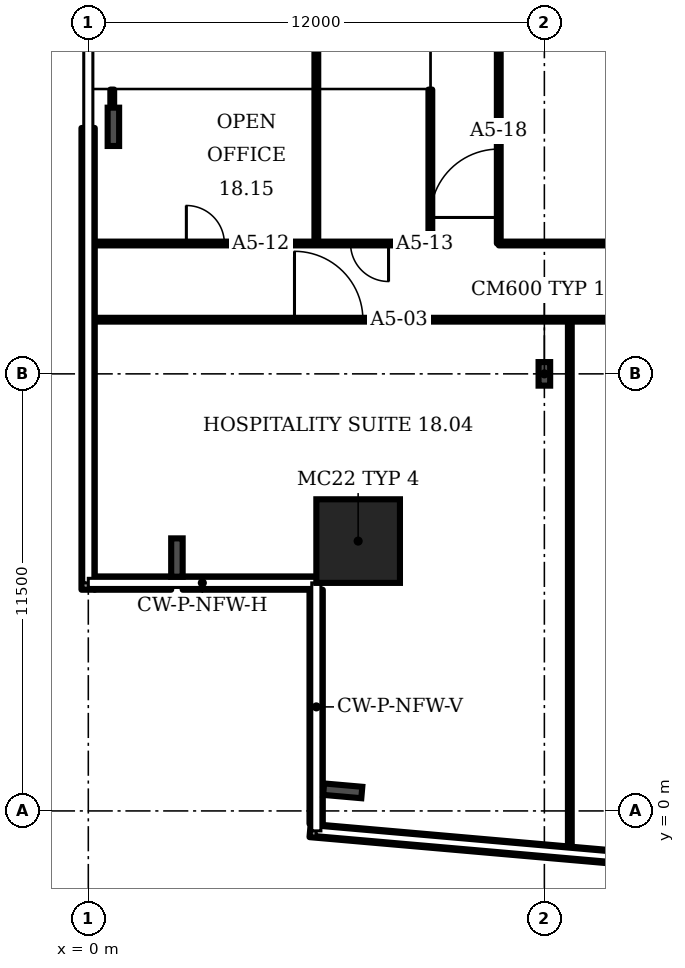
"""IFC4 building model, lengths in metres.
Left out: names, types, materials, properties, quantities, classifications, styles, units other than length and angle.
Written with IfcOpenShell. Run it as: python <this file> out.ifc"""

import sys

from ifc_helpers import new_model, si_unit, direction, frame, frame_2d, origin, origin_2d, place, context, subcontext, project, spatial, rectangle, i_section, extrude, element, fill, save


model = new_model("IFC4")
c1 = context("Model", 3, precision=1e-05, world=origin(), true_north=direction((0.0, 1.0)))
c2 = subcontext(c1, "Body", "Model", "MODEL_VIEW")
j1 = project(units=[si_unit("LENGTHUNIT", "METRE"), si_unit("PLANEANGLEUNIT", "RADIAN")], contexts=[c1])
p1 = place(None, origin())
s1 = spatial("IfcSite", under=j1, at=p1, CompositionType="ELEMENT")
p2 = place(p1, origin())
s2 = spatial("IfcBuilding", under=s1, at=p2, CompositionType="ELEMENT")
p3 = place(p2, frame((0.0, 0.0, 84.7)))
s3 = spatial("IfcBuildingStorey", under=s2, at=p3, CompositionType="ELEMENT", Elevation=84.7)
p4 = place(p3, frame((7.1, 7.1, 0.0), z_axis=(0.0, 0.0, 1.0), x_axis=(1.0, 0.0, 0.0)))
e1 = element("IfcColumn", 1, at=p4, inside=s3, PredefinedType="COLUMN", context=c2, shape_type="SweptSolid", body=[
    extrude(rectangle(XDim=2.2, YDim=2.2, at=origin_2d()), origin(), (0.0, 0.0, 1.0), 3.6),
])
for number, where, z_axis, x_axis in (
    (2, (6.694, 0.529, 0.0), (0.0, 0.0, 1.0), (-0.087, -0.996, 0.0)),
    (3, (0.66, 18.0, 0.0), (0.0, 0.0, 1.0), (-1.0, 0.0, 0.0)),
    (4, (2.332, 6.667, 0.0), (0.0, 0.0, 1.0), (-1.0, 0.0, 0.0)),
):
    element("IfcColumn", number, at=place(p3, frame(where, z_axis=z_axis, x_axis=x_axis)), inside=s3, PredefinedType="COLUMN", context=c2, shape_type="SweptSolid", body=[
        extrude(i_section(OverallWidth=0.302, OverallDepth=1.008, WebThickness=0.021, FlangeThickness=0.04, FilletRadius=0.03, at=origin_2d()), origin(), (0.0, 0.0, 1.0), 3.6),
    ])
p5 = place(p3, frame((12.0, 11.5, 0.0), z_axis=(0.0, 0.0, 1.0), x_axis=(1.0, 0.0, 0.0)))
e5 = element("IfcColumn", 5, at=p5, inside=s3, PredefinedType="COLUMN", context=c2, shape_type="SweptSolid", body=[
    extrude(i_section(OverallWidth=0.305, OverallDepth=0.62, WebThickness=0.021, FlangeThickness=0.04, FilletRadius=0.027, at=origin_2d()), origin(), (0.0, 0.0, 1.0), 3.6),
])
p6 = place(p3, frame((5.835, -0.516, 0.0), z_axis=(0.0, 0.0, 1.0), x_axis=(0.996192, -0.087142, 0.0)))
e6 = element("IfcWall", 6, at=p6, inside=s3, PredefinedType="SOLIDWALL", context=c2, shape_type="SweptSolid", body=[
    extrude(rectangle(XDim=11.607, YDim=0.35, at=frame_2d((5.804, 0.0))), origin(), (0.0, 0.0, 1.0), 1.0),
])
p7 = place(p3, frame((-0.005, 17.97, 0.0), z_axis=(0.0, 0.0, 1.0), x_axis=(0.0, -1.0, 0.0)))
e7 = element("IfcWall", 7, at=p7, inside=s3, PredefinedType="SOLIDWALL", context=c2, shape_type="SweptSolid", body=[
    extrude(rectangle(XDim=12.15, YDim=0.35, at=frame_2d((6.075, 0.0))), origin(), (0.0, 0.0, 1.0), 1.0),
])
p8 = place(p3, frame((0.17, 5.995, 0.0), z_axis=(0.0, 0.0, 1.0), x_axis=(1.0, 0.0, 0.0)))
e8 = element("IfcWall", 8, at=p8, inside=s3, PredefinedType="SOLIDWALL", context=c2, shape_type="SweptSolid", body=[
    extrude(rectangle(XDim=2.011, YDim=0.35, at=frame_2d((1.005, 0.0))), origin(), (0.0, 0.0, 1.0), 1.0),
])
p9 = place(p3, frame((2.483, 5.995, 0.0), z_axis=(0.0, 0.0, 1.0), x_axis=(1.0, 0.0, 0.0)))
e9 = element("IfcWall", 9, at=p9, inside=s3, PredefinedType="SOLIDWALL", context=c2, shape_type="SweptSolid", body=[
    extrude(rectangle(XDim=3.517, YDim=0.35, at=frame_2d((1.759, 0.0))), origin(), (0.0, 0.0, 1.0), 1.0),
])
p10 = place(p3, frame((5.995, 5.82, 0.0), z_axis=(0.0, 0.0, 1.0), x_axis=(0.0, -1.0, 0.0)))
e10 = element("IfcWall", 10, at=p10, inside=s3, PredefinedType="SOLIDWALL", context=c2, shape_type="SweptSolid", body=[
    extrude(rectangle(XDim=6.161, YDim=0.35, at=frame_2d((3.081, 0.0))), origin(), (0.0, 0.0, 1.0), 1.0),
])
p11 = place(p3, frame((0.02, 12.925, 0.0), z_axis=(0.0, 0.0, 1.0), x_axis=(1.0, 0.0, 0.0)))
e11 = element("IfcWall", 11, at=p11, inside=s3, PredefinedType="PARTITIONING", context=c2, shape_type="SweptSolid", body=[
    extrude(rectangle(XDim=43.48, YDim=0.1, at=frame_2d((21.74, 0.0))), origin(), (0.0, 0.0, 1.0), 3.2),
])
p12 = place(p11, frame((5.405, 0.0, 0.0)))
e12 = element("IfcOpeningElement", 12, at=p12, cuts=e11, PredefinedType="OPENING", context=c2, shape_type="SweptSolid", body=[
    extrude(rectangle(XDim=1.8, YDim=2.1, at=frame_2d((0.9, 1.05))), frame((0.0, 0.06, 0.0), z_axis=(0.0, -1.0, 0.0), x_axis=(1.0, 0.0, 0.0)), (0.0, 0.0, 1.0), 0.12),
])
p13 = place(p11, frame((15.475, 0.0, 0.0)))
e13 = element("IfcOpeningElement", 13, at=p13, cuts=e11, PredefinedType="OPENING", context=c2, shape_type="SweptSolid", body=[
    extrude(rectangle(XDim=1.0, YDim=2.1, at=frame_2d((0.5, 1.05))), frame((0.0, 0.06, 0.0), z_axis=(0.0, -1.0, 0.0), x_axis=(1.0, 0.0, 0.0)), (0.0, 0.0, 1.0), 0.12),
])
p14 = place(p11, frame((22.14, 0.0, 0.0)))
e14 = element("IfcOpeningElement", 14, at=p14, cuts=e11, PredefinedType="OPENING", context=c2, shape_type="SweptSolid", body=[
    extrude(rectangle(XDim=1.0, YDim=2.1, at=frame_2d((0.5, 1.05))), frame((0.0, 0.06, 0.0), z_axis=(0.0, -1.0, 0.0), x_axis=(1.0, 0.0, 0.0)), (0.0, 0.0, 1.0), 0.12),
])
p15 = place(p11, frame((31.805, 0.0, 0.0)))
e15 = element("IfcOpeningElement", 15, at=p15, cuts=e11, PredefinedType="OPENING", context=c2, shape_type="SweptSolid", body=[
    extrude(rectangle(XDim=1.8, YDim=2.1, at=frame_2d((0.9, 1.05))), frame((0.0, 0.06, 0.0), z_axis=(0.0, -1.0, 0.0), x_axis=(1.0, 0.0, 0.0)), (0.0, 0.0, 1.0), 0.12),
])
p16 = place(p3, frame((0.02, 14.93, 0.0), z_axis=(0.0, 0.0, 1.0), x_axis=(1.0, 0.0, 0.0)))
e16 = element("IfcWall", 16, at=p16, inside=s3, PredefinedType="PARTITIONING", context=c2, shape_type="SweptSolid", body=[
    extrude(rectangle(XDim=8.98, YDim=0.1, at=frame_2d((4.49, 0.0))), origin(), (0.0, 0.0, 1.0), 3.2),
])
p17 = place(p16, frame((2.56, 0.0, 0.0)))
e17 = element("IfcOpeningElement", 17, at=p17, cuts=e16, PredefinedType="OPENING", context=c2, shape_type="SweptSolid", body=[
    extrude(rectangle(XDim=1.0, YDim=2.1, at=frame_2d((0.5, 1.05))), frame((0.0, 0.06, 0.0), z_axis=(0.0, -1.0, 0.0), x_axis=(1.0, 0.0, 0.0)), (0.0, 0.0, 1.0), 0.12),
])
p18 = place(p16, frame((6.88, 0.0, 0.0)))
e18 = element("IfcOpeningElement", 18, at=p18, cuts=e16, PredefinedType="OPENING", context=c2, shape_type="SweptSolid", body=[
    extrude(rectangle(XDim=1.0, YDim=2.1, at=frame_2d((0.5, 1.05))), frame((0.0, 0.06, 0.0), z_axis=(0.0, -1.0, 0.0), x_axis=(1.0, 0.0, 0.0)), (0.0, 0.0, 1.0), 0.12),
])
p19 = place(p3, frame((0.63, 17.5, 0.0), z_axis=(0.0, 0.0, 1.0), x_axis=(0.0, 1.0, 0.0)))
e19 = element("IfcWall", 19, at=p19, inside=s3, PredefinedType="PARTITIONING", context=c2, shape_type="SweptSolid", body=[
    extrude(rectangle(XDim=1.48, YDim=0.1, at=frame_2d((0.74, 0.0))), origin(), (0.0, 0.0, 1.0), 2.58),
])
p20 = place(p3, frame((6.0, 14.93, 0.0), z_axis=(0.0, 0.0, 1.0), x_axis=(0.0, 1.0, 0.0)))
e20 = element("IfcWall", 20, at=p20, inside=s3, PredefinedType="PARTITIONING", context=c2, shape_type="SweptSolid", body=[
    extrude(rectangle(XDim=5.395, YDim=0.1, at=frame_2d((2.698, 0.0))), origin(), (0.0, 0.0, 1.0), 3.2),
])
p21 = place(p3, frame((9.0, 14.93, 0.0), z_axis=(0.0, 0.0, 1.0), x_axis=(0.0, 1.0, 0.0)))
e21 = element("IfcWall", 21, at=p21, inside=s3, PredefinedType="PARTITIONING", context=c2, shape_type="SweptSolid", body=[
    extrude(rectangle(XDim=4.05, YDim=0.1, at=frame_2d((2.025, 0.0))), origin(), (0.0, 0.0, 1.0), 3.2),
])
p22 = place(p3, frame((10.8, 14.93, 0.0), z_axis=(0.0, 0.0, 1.0), x_axis=(0.0, 1.0, 0.0)))
e22 = element("IfcWall", 22, at=p22, inside=s3, PredefinedType="PARTITIONING", context=c2, shape_type="SweptSolid", body=[
    extrude(rectangle(XDim=8.47, YDim=0.1, at=frame_2d((4.235, 0.0))), origin(), (0.0, 0.0, 1.0), 3.2),
])
p23 = place(p22, frame((0.685, 0.0, 0.0)))
e23 = element("IfcOpeningElement", 23, at=p23, cuts=e22, PredefinedType="OPENING", context=c2, shape_type="SweptSolid", body=[
    extrude(rectangle(XDim=1.8, YDim=2.1, at=frame_2d((0.9, 1.05))), frame((0.0, 0.06, 0.0), z_axis=(0.0, -1.0, 0.0), x_axis=(1.0, 0.0, 0.0)), (0.0, 0.0, 1.0), 0.12),
])
p24 = place(p3, frame((10.8, 14.93, 0.0), z_axis=(0.0, 0.0, 1.0), x_axis=(1.0, 0.0, 0.0)))
e24 = element("IfcWall", 24, at=p24, inside=s3, PredefinedType="PARTITIONING", context=c2, shape_type="SweptSolid", body=[
    extrude(rectangle(XDim=32.7, YDim=0.1, at=frame_2d((16.35, 0.0))), origin(), (0.0, 0.0, 1.0), 3.2),
])
p25 = place(p24, frame((7.6, 0.0, 0.0)))
e25 = element("IfcOpeningElement", 25, at=p25, cuts=e24, PredefinedType="OPENING", context=c2, shape_type="SweptSolid", body=[
    extrude(rectangle(XDim=1.0, YDim=2.1, at=frame_2d((0.5, 1.05))), frame((0.0, 0.06, 0.0), z_axis=(0.0, -1.0, 0.0), x_axis=(1.0, 0.0, 0.0)), (0.0, 0.0, 1.0), 0.12),
])
p26 = place(p3, frame((12.67, -1.088, 0.0), z_axis=(0.0, 0.0, 1.0), x_axis=(0.0, 1.0, 0.0)))
e26 = element("IfcWall", 26, at=p26, inside=s3, PredefinedType="PARTITIONING", context=c2, shape_type="SweptSolid", body=[
    extrude(rectangle(XDim=14.013, YDim=0.1, at=frame_2d((7.007, 0.0))), origin(), (0.0, 0.0, 1.0), 3.2),
])
p27 = place(p12, origin())
e27 = element("IfcDoor", 27, at=p27, inside=s3, OperationType="DOUBLE_DOOR_SINGLE_SWING", PredefinedType="DOOR", context=c2, shape_type="SweptSolid", body=[
    extrude(rectangle(XDim=1.8, YDim=2.1, at=frame_2d((0.9, 1.05))), frame((0.0, 0.025, 0.0), z_axis=(0.0, -1.0, 0.0), x_axis=(1.0, 0.0, 0.0)), (0.0, 0.0, 1.0), 0.05),
])
fill(e12, e27)
p28 = place(p17, origin())
e28 = element("IfcDoor", 28, at=p28, inside=s3, OperationType="SINGLE_SWING_LEFT", PredefinedType="DOOR", context=c2, shape_type="SweptSolid", body=[
    extrude(rectangle(XDim=1.0, YDim=2.1, at=frame_2d((0.5, 1.05))), frame((0.0, 0.025, 0.0), z_axis=(0.0, -1.0, 0.0), x_axis=(1.0, 0.0, 0.0)), (0.0, 0.0, 1.0), 0.05),
])
fill(e17, e28)
p29 = place(p18, origin())
e29 = element("IfcDoor", 29, at=p29, inside=s3, OperationType="SINGLE_SWING_RIGHT", PredefinedType="DOOR", context=c2, shape_type="SweptSolid", body=[
    extrude(rectangle(XDim=1.0, YDim=2.1, at=frame_2d((0.5, 1.05))), frame((0.0, 0.025, 0.0), z_axis=(0.0, -1.0, 0.0), x_axis=(1.0, 0.0, 0.0)), (0.0, 0.0, 1.0), 0.05),
])
fill(e18, e29)
p30 = place(p23, origin())
e30 = element("IfcDoor", 30, at=p30, inside=s3, OperationType="DOUBLE_DOOR_SINGLE_SWING", PredefinedType="DOOR", context=c2, shape_type="SweptSolid", body=[
    extrude(rectangle(XDim=1.8, YDim=2.1, at=frame_2d((0.9, 1.05))), frame((0.0, 0.025, 0.0), z_axis=(0.0, -1.0, 0.0), x_axis=(1.0, 0.0, 0.0)), (0.0, 0.0, 1.0), 0.05),
])
fill(e23, e30)
save(model, sys.argv[1])
